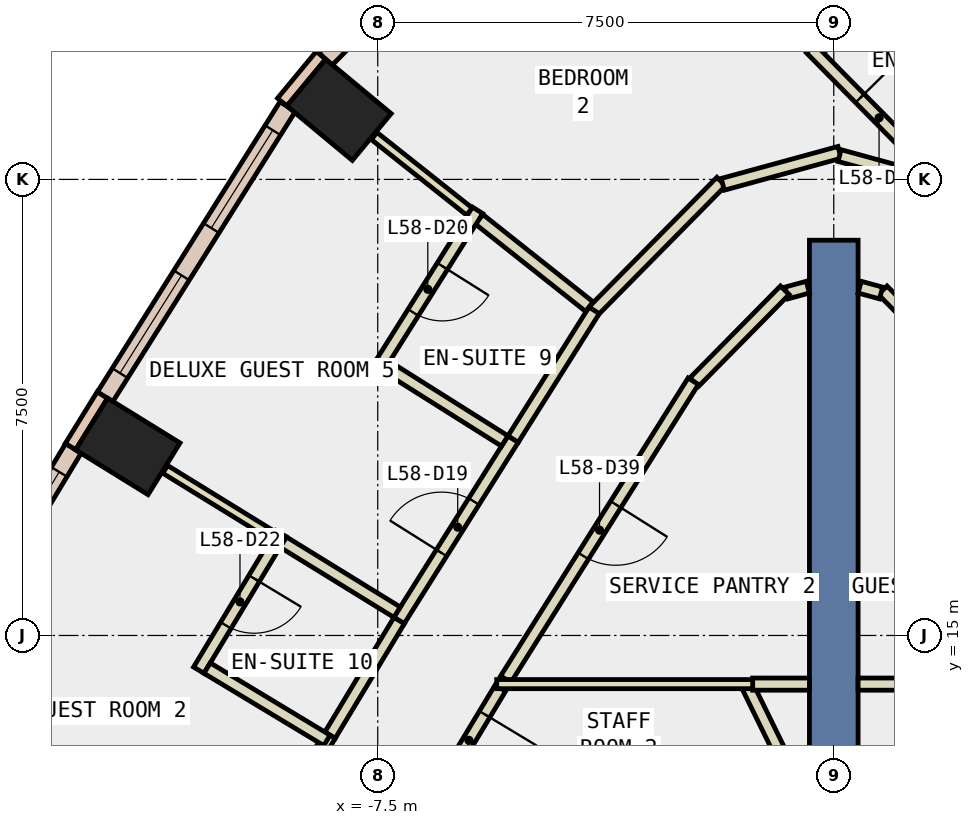
"""IFC4 building model, lengths in metres.
Left out: names, types, materials, properties, quantities, classifications, styles, units other than length and angle.
Written with IfcOpenShell. Run it as: python <this file> out.ifc"""

import sys

from ifc_helpers import new_model, si_unit, direction, frame, frame_2d, origin, origin_2d, place, context, subcontext, project, spatial, rectangle, extrude, element, fill, save


model = new_model("IFC4")
c1 = context("Model", 3, precision=1e-05, world=origin(), true_north=direction((0.0, 1.0)))
c2 = subcontext(c1, "Body", "Model", "MODEL_VIEW")
j1 = project(units=[si_unit("LENGTHUNIT", "METRE"), si_unit("PLANEANGLEUNIT", "RADIAN")], contexts=[c1])
p1 = place(None, origin())
s1 = spatial("IfcSite", under=j1, at=p1, CompositionType="ELEMENT")
p2 = place(p1, origin())
s2 = spatial("IfcBuilding", under=s1, at=p2, CompositionType="ELEMENT")
p3 = place(p2, frame((0.0, 0.0, 255.8)))
s3 = spatial("IfcBuildingStorey", under=s2, at=p3, CompositionType="ELEMENT", Elevation=255.8)
for number, where, z_axis, x_axis in (
    (1, (-8.137, 23.645, -0.34), (0.0, 0.0, 1.0), (0.639, 0.769, 0.0)),
    (2, (-11.61, 18.109, -0.34), (0.0, 0.0, 1.0), (0.526, 0.851, 0.0)),
):
    element("IfcColumn", number, at=place(p3, frame(where, z_axis=z_axis, x_axis=x_axis)), inside=s3, PredefinedType="COLUMN", context=c2, shape_type="SweptSolid", body=[
        extrude(rectangle(XDim=1.0, YDim=1.4, at=origin_2d()), origin(), (0.0, 0.0, 1.0), 3.6),
    ])
p4 = place(p3, frame((0.0, 12.5, -0.34), z_axis=(0.0, 0.0, 1.0), x_axis=(0.0, 1.0, 0.0)))
e3 = element("IfcWall", 3, at=p4, inside=s3, PredefinedType="SHEAR", context=c2, shape_type="SweptSolid", body=[
    extrude(rectangle(XDim=9.0, YDim=0.8, at=frame_2d((4.5, 0.0))), origin(), (0.0, 0.0, 1.0), 3.6),
])
p5 = place(p3, frame((-8.433, 24.541, 0.0), z_axis=(0.0, 0.0, 1.0), x_axis=(-0.637972365578, -0.770059257953, 0.0)))
e4 = element("IfcWall", 4, at=p5, inside=s3, PredefinedType="STANDARD", context=c2, shape_type="SweptSolid", body=[
    extrude(rectangle(XDim=1.0, YDim=0.2, at=frame_2d((0.5, 0.0))), origin(), (0.0, 0.0, 1.0), 3.26),
])
p6 = place(p3, frame((-12.028, 18.955, 0.0), z_axis=(0.0, 0.0, 1.0), x_axis=(-0.525648735675, -0.850701714282, 0.0)))
e5 = element("IfcWall", 5, at=p6, inside=s3, PredefinedType="STANDARD", context=c2, shape_type="SweptSolid", body=[
    extrude(rectangle(XDim=1.0, YDim=0.2, at=frame_2d((0.5, 0.0))), origin(), (0.0, 0.0, 1.0), 3.26),
])
p7 = place(p3, frame((-5.455, 27.424, 0.0), z_axis=(0.0, 0.0, 1.0), x_axis=(-0.702488411246, -0.711695181989, 0.0)))
e6 = element("IfcWall", 6, at=p7, inside=s3, PredefinedType="STANDARD", context=c2, shape_type="SweptSolid", body=[
    extrude(rectangle(XDim=4.137, YDim=0.3, at=frame_2d((2.068, 0.0))), origin(), (0.0, 0.0, 1.0), 3.26),
])
p8 = place(p7, frame((1.368, 0.0, 0.9)))
e7 = element("IfcOpeningElement", 7, at=p8, cuts=e6, PredefinedType="OPENING", context=c2, shape_type="SweptSolid", body=[
    extrude(rectangle(XDim=1.4, YDim=2.0, at=frame_2d((0.7, 1.0))), frame((0.0, 0.16, 0.0), z_axis=(0.0, -1.0, 0.0), x_axis=(1.0, 0.0, 0.0)), (0.0, 0.0, 1.0), 0.32),
])
p9 = place(p3, frame((-8.981, 23.697, 0.0), z_axis=(0.0, 0.0, 1.0), x_axis=(-0.532558226688, -0.846393369059, 0.0)))
e8 = element("IfcWall", 8, at=p9, inside=s3, PredefinedType="STANDARD", context=c2, shape_type="SweptSolid", body=[
    extrude(rectangle(XDim=5.637, YDim=0.3, at=frame_2d((2.818, 0.0))), origin(), (0.0, 0.0, 1.0), 3.26),
])
p10 = place(p9, frame((0.459, 0.0, 0.9)))
e9 = element("IfcOpeningElement", 9, at=p10, cuts=e8, PredefinedType="OPENING", context=c2, shape_type="SweptSolid", body=[
    extrude(rectangle(XDim=1.9, YDim=2.0, at=frame_2d((0.95, 1.0))), frame((0.0, 0.16, 0.0), z_axis=(0.0, -1.0, 0.0), x_axis=(1.0, 0.0, 0.0)), (0.0, 0.0, 1.0), 0.32),
])
p11 = place(p9, frame((3.278, 0.0, 0.9)))
e10 = element("IfcOpeningElement", 10, at=p11, cuts=e8, PredefinedType="OPENING", context=c2, shape_type="SweptSolid", body=[
    extrude(rectangle(XDim=1.9, YDim=2.0, at=frame_2d((0.95, 1.0))), frame((0.0, 0.16, 0.0), z_axis=(0.0, -1.0, 0.0), x_axis=(1.0, 0.0, 0.0)), (0.0, 0.0, 1.0), 0.32),
])
p12 = place(p3, frame((-12.506, 18.076, 0.0), z_axis=(0.0, 0.0, 1.0), x_axis=(-0.516269519619, -0.856426169096, 0.0)))
e11 = element("IfcWall", 11, at=p12, inside=s3, PredefinedType="STANDARD", context=c2, shape_type="SweptSolid", body=[
    extrude(rectangle(XDim=5.603, YDim=0.3, at=frame_2d((2.802, 0.0))), origin(), (0.0, 0.0, 1.0), 3.26),
])
p13 = place(p12, frame((0.451, 0.0, 0.9)))
e12 = element("IfcOpeningElement", 12, at=p13, cuts=e11, PredefinedType="OPENING", context=c2, shape_type="SweptSolid", body=[
    extrude(rectangle(XDim=1.9, YDim=2.0, at=frame_2d((0.95, 1.0))), frame((0.0, 0.16, 0.0), z_axis=(0.0, -1.0, 0.0), x_axis=(1.0, 0.0, 0.0)), (0.0, 0.0, 1.0), 0.32),
])
p14 = place(p12, frame((3.253, 0.0, 0.9)))
e13 = element("IfcOpeningElement", 13, at=p14, cuts=e11, PredefinedType="OPENING", context=c2, shape_type="SweptSolid", body=[
    extrude(rectangle(XDim=1.9, YDim=2.0, at=frame_2d((0.95, 1.0))), frame((0.0, 0.16, 0.0), z_axis=(0.0, -1.0, 0.0), x_axis=(1.0, 0.0, 0.0)), (0.0, 0.0, 1.0), 0.32),
])
p15 = place(p3, frame((-0.6, 12.5, 0.0), z_axis=(0.0, 0.0, 1.0), x_axis=(-0.440531456598, 0.897737175206, 0.0)))
e14 = element("IfcWall", 14, at=p15, inside=s3, PredefinedType="PARTITIONING", context=c2, shape_type="SweptSolid", body=[
    extrude(rectangle(XDim=1.918, YDim=0.2, at=frame_2d((0.959, 0.0))), origin(), (0.0, 0.0, 1.0), 3.26),
])
p16 = place(p3, frame((-5.482, 14.136, 0.0), z_axis=(0.0, 0.0, 1.0), x_axis=(-0.516156559549, -0.856494253357, 0.0)))
e15 = element("IfcWall", 15, at=p16, inside=s3, PredefinedType="PARTITIONING", context=c2, shape_type="SweptSolid", body=[
    extrude(rectangle(XDim=2.009, YDim=0.2, at=frame_2d((1.005, 0.0))), origin(), (0.0, 0.0, 1.0), 3.26),
])
p17 = place(p16, frame((0.504, 0.0, 0.0)))
e16 = element("IfcOpeningElement", 16, at=p17, cuts=e15, PredefinedType="OPENING", context=c2, shape_type="SweptSolid", body=[
    extrude(rectangle(XDim=1.0, YDim=2.1, at=frame_2d((0.5, 1.05))), frame((0.0, 0.11, 0.0), z_axis=(0.0, -1.0, 0.0), x_axis=(1.0, 0.0, 0.0)), (0.0, 0.0, 1.0), 0.22),
])
p18 = place(p3, frame((0.4, 14.2, 0.0), z_axis=(0.0, 0.0, 1.0), x_axis=(1.0, 0.0, 0.0)))
e17 = element("IfcWall", 17, at=p18, inside=s3, PredefinedType="PARTITIONING", context=c2, shape_type="SweptSolid", body=[
    extrude(rectangle(XDim=5.143, YDim=0.2, at=frame_2d((2.572, 0.0))), origin(), (0.0, 0.0, 1.0), 3.26),
])
p19 = place(p3, frame((2.294, 19.167, 0.0), z_axis=(0.0, 0.0, 1.0), x_axis=(-0.70213913596, 0.712039769784, 0.0)))
e18 = element("IfcWall", 18, at=p19, inside=s3, PredefinedType="PARTITIONING", context=c2, shape_type="SweptSolid", body=[
    extrude(rectangle(XDim=2.121, YDim=0.2, at=frame_2d((1.06, 0.0))), origin(), (0.0, 0.0, 1.0), 3.26),
])
p20 = place(p3, frame((0.778, 20.632, 0.0), z_axis=(0.0, 0.0, 1.0), x_axis=(-0.964810127056, 0.262947558899, 0.0)))
e19 = element("IfcWall", 19, at=p20, inside=s3, PredefinedType="PARTITIONING", context=c2, shape_type="SweptSolid", body=[
    extrude(rectangle(XDim=0.365, YDim=0.2, at=frame_2d((0.183, 0.0))), origin(), (0.0, 0.0, 1.0), 3.26),
])
p21 = place(p3, frame((-1.334, 14.2, 0.0), z_axis=(0.0, 0.0, 1.0), x_axis=(1.0, 0.0, 0.0)))
e20 = element("IfcWall", 20, at=p21, inside=s3, PredefinedType="PARTITIONING", context=c2, shape_type="SweptSolid", body=[
    extrude(rectangle(XDim=0.934, YDim=0.2, at=frame_2d((0.467, 0.0))), origin(), (0.0, 0.0, 1.0), 3.26),
])
p22 = place(p3, frame((-0.426, 20.728, 0.0), z_axis=(0.0, 0.0, 1.0), x_axis=(-0.964810127056, -0.262947558899, 0.0)))
e21 = element("IfcWall", 21, at=p22, inside=s3, PredefinedType="PARTITIONING", context=c2, shape_type="SweptSolid", body=[
    extrude(rectangle(XDim=0.365, YDim=0.2, at=frame_2d((0.183, 0.0))), origin(), (0.0, 0.0, 1.0), 3.26),
])
p23 = place(p3, frame((-0.805, 20.677, 0.0), z_axis=(0.0, 0.0, 1.0), x_axis=(-0.70213913596, -0.712039769784, 0.0)))
e22 = element("IfcWall", 22, at=p23, inside=s3, PredefinedType="PARTITIONING", context=c2, shape_type="SweptSolid", body=[
    extrude(rectangle(XDim=2.121, YDim=0.2, at=frame_2d((1.06, 0.0))), origin(), (0.0, 0.0, 1.0), 3.26),
])
p24 = place(p3, frame((-2.311, 19.181, 0.0), z_axis=(0.0, 0.0, 1.0), x_axis=(-0.532551510955, -0.846397594621, 0.0)))
e23 = element("IfcWall", 23, at=p24, inside=s3, PredefinedType="PARTITIONING", context=c2, shape_type="SweptSolid", body=[
    extrude(rectangle(XDim=5.789, YDim=0.2, at=frame_2d((2.895, 0.0))), origin(), (0.0, 0.0, 1.0), 3.26),
])
p25 = place(p24, frame((2.394, 0.0, 0.0)))
e24 = element("IfcOpeningElement", 24, at=p25, cuts=e23, PredefinedType="OPENING", context=c2, shape_type="SweptSolid", body=[
    extrude(rectangle(XDim=1.0, YDim=2.1, at=frame_2d((0.5, 1.05))), frame((0.0, 0.11, 0.0), z_axis=(0.0, -1.0, 0.0), x_axis=(1.0, 0.0, 0.0)), (0.0, 0.0, 1.0), 0.22),
])
p26 = place(p3, frame((-4.012, 20.275, 0.0), z_axis=(0.0, 0.0, 1.0), x_axis=(0.702488437915, 0.711695155664, 0.0)))
e25 = element("IfcWall", 25, at=p26, inside=s3, PredefinedType="PARTITIONING", context=c2, shape_type="SweptSolid", body=[
    extrude(rectangle(XDim=3.076, YDim=0.2, at=frame_2d((1.538, 0.0))), origin(), (0.0, 0.0, 1.0), 3.26),
])
p27 = place(p3, frame((-1.825, 22.419, 0.0), z_axis=(0.0, 0.0, 1.0), x_axis=(0.964477541401, 0.26416485787, 0.0)))
e26 = element("IfcWall", 26, at=p27, inside=s3, PredefinedType="PARTITIONING", context=c2, shape_type="SweptSolid", body=[
    extrude(rectangle(XDim=1.992, YDim=0.2, at=frame_2d((0.996, 0.0))), origin(), (0.0, 0.0, 1.0), 3.26),
])
p28 = place(p3, frame((0.096, 22.892, 0.0), z_axis=(0.0, 0.0, 1.0), x_axis=(0.964519582336, -0.264011316595, 0.0)))
e27 = element("IfcWall", 27, at=p28, inside=s3, PredefinedType="PARTITIONING", context=c2, shape_type="SweptSolid", body=[
    extrude(rectangle(XDim=1.849, YDim=0.2, at=frame_2d((0.924, 0.0))), origin(), (0.0, 0.0, 1.0), 3.26),
])
p29 = place(p3, frame((-7.15, 15.246, 0.0), z_axis=(0.0, 0.0, 1.0), x_axis=(0.532449518014, 0.846461759778, 0.0)))
e28 = element("IfcWall", 28, at=p29, inside=s3, PredefinedType="PARTITIONING", context=c2, shape_type="SweptSolid", body=[
    extrude(rectangle(XDim=3.525, YDim=0.2, at=frame_2d((1.763, 0.0))), origin(), (0.0, 0.0, 1.0), 3.26),
])
p30 = place(p29, frame((1.313, 0.0, 0.0)))
e29 = element("IfcOpeningElement", 29, at=p30, cuts=e28, PredefinedType="OPENING", context=c2, shape_type="SweptSolid", body=[
    extrude(rectangle(XDim=1.0, YDim=2.1, at=frame_2d((0.5, 1.05))), frame((0.0, 0.11, 0.0), z_axis=(0.0, -1.0, 0.0), x_axis=(1.0, 0.0, 0.0)), (0.0, 0.0, 1.0), 0.22),
])
p31 = place(p3, frame((-5.273, 18.23, 0.0), z_axis=(0.0, 0.0, 1.0), x_axis=(0.532743344325, 0.846276863135, 0.0)))
e30 = element("IfcWall", 30, at=p31, inside=s3, PredefinedType="PARTITIONING", context=c2, shape_type="SweptSolid", body=[
    extrude(rectangle(XDim=2.5, YDim=0.2, at=frame_2d((1.25, 0.0))), origin(), (0.0, 0.0, 1.0), 3.26),
])
p32 = place(p3, frame((-10.498, 9.689, 0.0), z_axis=(0.0, 0.0, 1.0), x_axis=(0.516353342298, 0.856375633643, 0.0)))
e31 = element("IfcWall", 31, at=p32, inside=s3, PredefinedType="PARTITIONING", context=c2, shape_type="SweptSolid", body=[
    extrude(rectangle(XDim=4.288, YDim=0.2, at=frame_2d((2.144, 0.0))), origin(), (0.0, 0.0, 1.0), 3.26),
])
p33 = place(p32, frame((1.694, 0.0, 0.0)))
e32 = element("IfcOpeningElement", 32, at=p33, cuts=e31, PredefinedType="OPENING", context=c2, shape_type="SweptSolid", body=[
    extrude(rectangle(XDim=1.0, YDim=2.1, at=frame_2d((0.5, 1.05))), frame((0.0, 0.11, 0.0), z_axis=(0.0, -1.0, 0.0), x_axis=(1.0, 0.0, 0.0)), (0.0, 0.0, 1.0), 0.22),
])
p34 = place(p3, frame((-8.284, 13.361, 0.0), z_axis=(0.0, 0.0, 1.0), x_axis=(0.516354965559, 0.856374654893, 0.0)))
e33 = element("IfcWall", 33, at=p34, inside=s3, PredefinedType="PARTITIONING", context=c2, shape_type="SweptSolid", body=[
    extrude(rectangle(XDim=2.2, YDim=0.2, at=frame_2d((1.1, 0.0))), origin(), (0.0, 0.0, 1.0), 3.26),
])
p35 = place(p3, frame((-1.334, 14.2, 0.0), z_axis=(0.0, 0.0, 1.0), x_axis=(-1.0, 0.0, 0.0)))
e34 = element("IfcWall", 34, at=p35, inside=s3, PredefinedType="PARTITIONING", context=c2, shape_type="SweptSolid", body=[
    extrude(rectangle(XDim=4.209, YDim=0.15, at=frame_2d((2.104, 0.0))), origin(), (0.0, 0.0, 1.0), 3.26),
])
p36 = place(p3, frame((1.506, 26.372, 0.0), z_axis=(0.0, 0.0, 1.0), x_axis=(-0.711773999329, -0.702408551969, 0.0)))
e35 = element("IfcWall", 35, at=p36, inside=s3, PredefinedType="PARTITIONING", context=c2, shape_type="SweptSolid", body=[
    extrude(rectangle(XDim=2.45, YDim=0.2, at=frame_2d((1.225, 0.0))), origin(), (0.0, 0.0, 1.0), 3.26),
])
p37 = place(p3, frame((-0.379, 24.652, 0.0), z_axis=(0.0, 0.0, 1.0), x_axis=(0.702559610983, -0.711624896286, 0.0)))
e36 = element("IfcWall", 36, at=p37, inside=s3, PredefinedType="PARTITIONING", context=c2, shape_type="SweptSolid", body=[
    extrude(rectangle(XDim=3.124, YDim=0.2, at=frame_2d((1.562, 0.0))), origin(), (0.0, 0.0, 1.0), 3.26),
])
p38 = place(p37, frame((1.15, 0.0, 0.0)))
e37 = element("IfcOpeningElement", 37, at=p38, cuts=e36, PredefinedType="OPENING", context=c2, shape_type="SweptSolid", body=[
    extrude(rectangle(XDim=0.9, YDim=2.1, at=frame_2d((0.45, 1.05))), frame((0.0, 0.11, 0.0), z_axis=(0.0, -1.0, 0.0), x_axis=(1.0, 0.0, 0.0)), (0.0, 0.0, 1.0), 0.22),
])
p39 = place(p3, frame((-5.99, 21.97, 0.0), z_axis=(0.0, 0.0, 1.0), x_axis=(-0.783573405437, 0.621299218003, 0.0)))
e38 = element("IfcWall", 38, at=p39, inside=s3, PredefinedType="PARTITIONING", context=c2, shape_type="SweptSolid", body=[
    extrude(rectangle(XDim=2.002, YDim=0.15, at=frame_2d((1.001, 0.0))), origin(), (0.0, 0.0, 1.0), 3.26),
])
p40 = place(p3, frame((-4.02, 20.408, 0.0), z_axis=(0.0, 0.0, 1.0), x_axis=(-0.783681902275, 0.621162358846, 0.0)))
e39 = element("IfcWall", 39, at=p40, inside=s3, PredefinedType="PARTITIONING", context=c2, shape_type="SweptSolid", body=[
    extrude(rectangle(XDim=2.313, YDim=0.2, at=frame_2d((1.157, 0.0))), origin(), (0.0, 0.0, 1.0), 3.26),
])
p41 = place(p3, frame((-5.858, 21.992, 0.0), z_axis=(0.0, 0.0, 1.0), x_axis=(-0.532874387162, -0.846194355634, 0.0)))
e40 = element("IfcWall", 40, at=p41, inside=s3, PredefinedType="PARTITIONING", context=c2, shape_type="SweptSolid", body=[
    extrude(rectangle(XDim=3.073, YDim=0.2, at=frame_2d((1.536, 0.0))), origin(), (0.0, 0.0, 1.0), 3.26),
])
p42 = place(p41, frame((1.086, 0.0, 0.0)))
e41 = element("IfcOpeningElement", 41, at=p42, cuts=e40, PredefinedType="OPENING", context=c2, shape_type="SweptSolid", body=[
    extrude(rectangle(XDim=0.9, YDim=2.1, at=frame_2d((0.45, 1.05))), frame((0.0, 0.11, 0.0), z_axis=(0.0, -1.0, 0.0), x_axis=(1.0, 0.0, 0.0)), (0.0, 0.0, 1.0), 0.22),
])
p43 = place(p3, frame((-7.357, 19.423, 0.0), z_axis=(0.0, 0.0, 1.0), x_axis=(0.846270070045, -0.532754135176, 0.0)))
e42 = element("IfcWall", 42, at=p43, inside=s3, PredefinedType="PARTITIONING", context=c2, shape_type="SweptSolid", body=[
    extrude(rectangle(XDim=2.3, YDim=0.2, at=frame_2d((1.15, 0.0))), origin(), (0.0, 0.0, 1.0), 3.26),
])
p44 = place(p3, frame((-9.225, 16.641, 0.0), z_axis=(0.0, 0.0, 1.0), x_axis=(-0.85144868382, 0.524437926566, 0.0)))
e43 = element("IfcWall", 43, at=p44, inside=s3, PredefinedType="PARTITIONING", context=c2, shape_type="SweptSolid", body=[
    extrude(rectangle(XDim=2.08, YDim=0.15, at=frame_2d((1.04, 0.0))), origin(), (0.0, 0.0, 1.0), 3.26),
])
p45 = place(p3, frame((-7.182, 15.383, 0.0), z_axis=(0.0, 0.0, 1.0), x_axis=(-0.851498142432, 0.524357619792, 0.0)))
e44 = element("IfcWall", 44, at=p45, inside=s3, PredefinedType="PARTITIONING", context=c2, shape_type="SweptSolid", body=[
    extrude(rectangle(XDim=2.198, YDim=0.2, at=frame_2d((1.099, 0.0))), origin(), (0.0, 0.0, 1.0), 3.26),
])
p46 = place(p3, frame((-9.088, 16.674, 0.0), z_axis=(0.0, 0.0, 1.0), x_axis=(-0.516780274192, -0.856118069081, 0.0)))
e45 = element("IfcWall", 45, at=p46, inside=s3, PredefinedType="PARTITIONING", context=c2, shape_type="SweptSolid", body=[
    extrude(rectangle(XDim=2.623, YDim=0.2, at=frame_2d((1.311, 0.0))), origin(), (0.0, 0.0, 1.0), 3.26),
])
p47 = place(p46, frame((0.861, 0.0, 0.0)))
e46 = element("IfcOpeningElement", 46, at=p47, cuts=e45, PredefinedType="OPENING", context=c2, shape_type="SweptSolid", body=[
    extrude(rectangle(XDim=0.9, YDim=2.1, at=frame_2d((0.45, 1.05))), frame((0.0, 0.11, 0.0), z_axis=(0.0, -1.0, 0.0), x_axis=(1.0, 0.0, 0.0)), (0.0, 0.0, 1.0), 0.22),
])
p48 = place(p3, frame((-10.306, 14.463, 0.0), z_axis=(0.0, 0.0, 1.0), x_axis=(0.856338986581, -0.51641411683, 0.0)))
e47 = element("IfcWall", 47, at=p48, inside=s3, PredefinedType="PARTITIONING", context=c2, shape_type="SweptSolid", body=[
    extrude(rectangle(XDim=2.301, YDim=0.2, at=frame_2d((1.15, 0.0))), origin(), (0.0, 0.0, 1.0), 3.26),
])
p49 = place(p10, origin())
e48 = element("IfcWindow", 48, at=p49, inside=s3, PartitioningType="SINGLE_PANEL", PredefinedType="WINDOW", context=c2, shape_type="SweptSolid", body=[
    extrude(rectangle(XDim=1.9, YDim=2.0, at=frame_2d((0.95, 1.0))), frame((0.0, 0.03, 0.0), z_axis=(0.0, -1.0, 0.0), x_axis=(1.0, 0.0, 0.0)), (0.0, 0.0, 1.0), 0.06),
])
fill(e9, e48)
p50 = place(p11, origin())
e49 = element("IfcWindow", 49, at=p50, inside=s3, PartitioningType="SINGLE_PANEL", PredefinedType="WINDOW", context=c2, shape_type="SweptSolid", body=[
    extrude(rectangle(XDim=1.9, YDim=2.0, at=frame_2d((0.95, 1.0))), frame((0.0, 0.03, 0.0), z_axis=(0.0, -1.0, 0.0), x_axis=(1.0, 0.0, 0.0)), (0.0, 0.0, 1.0), 0.06),
])
fill(e10, e49)
p51 = place(p13, origin())
e50 = element("IfcWindow", 50, at=p51, inside=s3, PartitioningType="SINGLE_PANEL", PredefinedType="WINDOW", context=c2, shape_type="SweptSolid", body=[
    extrude(rectangle(XDim=1.9, YDim=2.0, at=frame_2d((0.95, 1.0))), frame((0.0, 0.03, 0.0), z_axis=(0.0, -1.0, 0.0), x_axis=(1.0, 0.0, 0.0)), (0.0, 0.0, 1.0), 0.06),
])
fill(e12, e50)
p52 = place(p38, origin())
e51 = element("IfcDoor", 51, at=p52, inside=s3, OperationType="SINGLE_SWING_RIGHT", PredefinedType="DOOR", context=c2, shape_type="SweptSolid", body=[
    extrude(rectangle(XDim=0.9, YDim=2.1, at=frame_2d((0.45, 1.05))), frame((0.0, 0.025, 0.0), z_axis=(0.0, -1.0, 0.0), x_axis=(1.0, 0.0, 0.0)), (0.0, 0.0, 1.0), 0.05),
])
fill(e37, e51)
p53 = place(p30, origin())
e52 = element("IfcDoor", 52, at=p53, inside=s3, OperationType="SINGLE_SWING_RIGHT", PredefinedType="DOOR", context=c2, shape_type="SweptSolid", body=[
    extrude(rectangle(XDim=1.0, YDim=2.1, at=frame_2d((0.5, 1.05))), frame((0.0, 0.025, 0.0), z_axis=(0.0, -1.0, 0.0), x_axis=(1.0, 0.0, 0.0)), (0.0, 0.0, 1.0), 0.05),
])
fill(e29, e52)
p54 = place(p42, origin())
e53 = element("IfcDoor", 53, at=p54, inside=s3, OperationType="SINGLE_SWING_LEFT", PredefinedType="DOOR", context=c2, shape_type="SweptSolid", body=[
    extrude(rectangle(XDim=0.9, YDim=2.1, at=frame_2d((0.45, 1.05))), frame((0.0, 0.025, 0.0), z_axis=(0.0, -1.0, 0.0), x_axis=(1.0, 0.0, 0.0)), (0.0, 0.0, 1.0), 0.05),
])
fill(e41, e53)
p55 = place(p47, origin())
e54 = element("IfcDoor", 54, at=p55, inside=s3, OperationType="SINGLE_SWING_LEFT", PredefinedType="DOOR", context=c2, shape_type="SweptSolid", body=[
    extrude(rectangle(XDim=0.9, YDim=2.1, at=frame_2d((0.45, 1.05))), frame((0.0, 0.025, 0.0), z_axis=(0.0, -1.0, 0.0), x_axis=(1.0, 0.0, 0.0)), (0.0, 0.0, 1.0), 0.05),
])
fill(e46, e54)
p56 = place(p25, origin())
e55 = element("IfcDoor", 55, at=p56, inside=s3, OperationType="SINGLE_SWING_LEFT", PredefinedType="DOOR", context=c2, shape_type="SweptSolid", body=[
    extrude(rectangle(XDim=1.0, YDim=2.1, at=frame_2d((0.5, 1.05))), frame((0.0, 0.025, 0.0), z_axis=(0.0, -1.0, 0.0), x_axis=(1.0, 0.0, 0.0)), (0.0, 0.0, 1.0), 0.05),
])
fill(e24, e55)
p57 = place(p17, origin())
e56 = element("IfcDoor", 56, at=p57, inside=s3, OperationType="SINGLE_SWING_LEFT", PredefinedType="DOOR", context=c2, shape_type="SweptSolid", body=[
    extrude(rectangle(XDim=1.0, YDim=2.1, at=frame_2d((0.5, 1.05))), frame((0.0, 0.025, 0.0), z_axis=(0.0, -1.0, 0.0), x_axis=(1.0, 0.0, 0.0)), (0.0, 0.0, 1.0), 0.05),
])
fill(e16, e56)
save(model, sys.argv[1])
